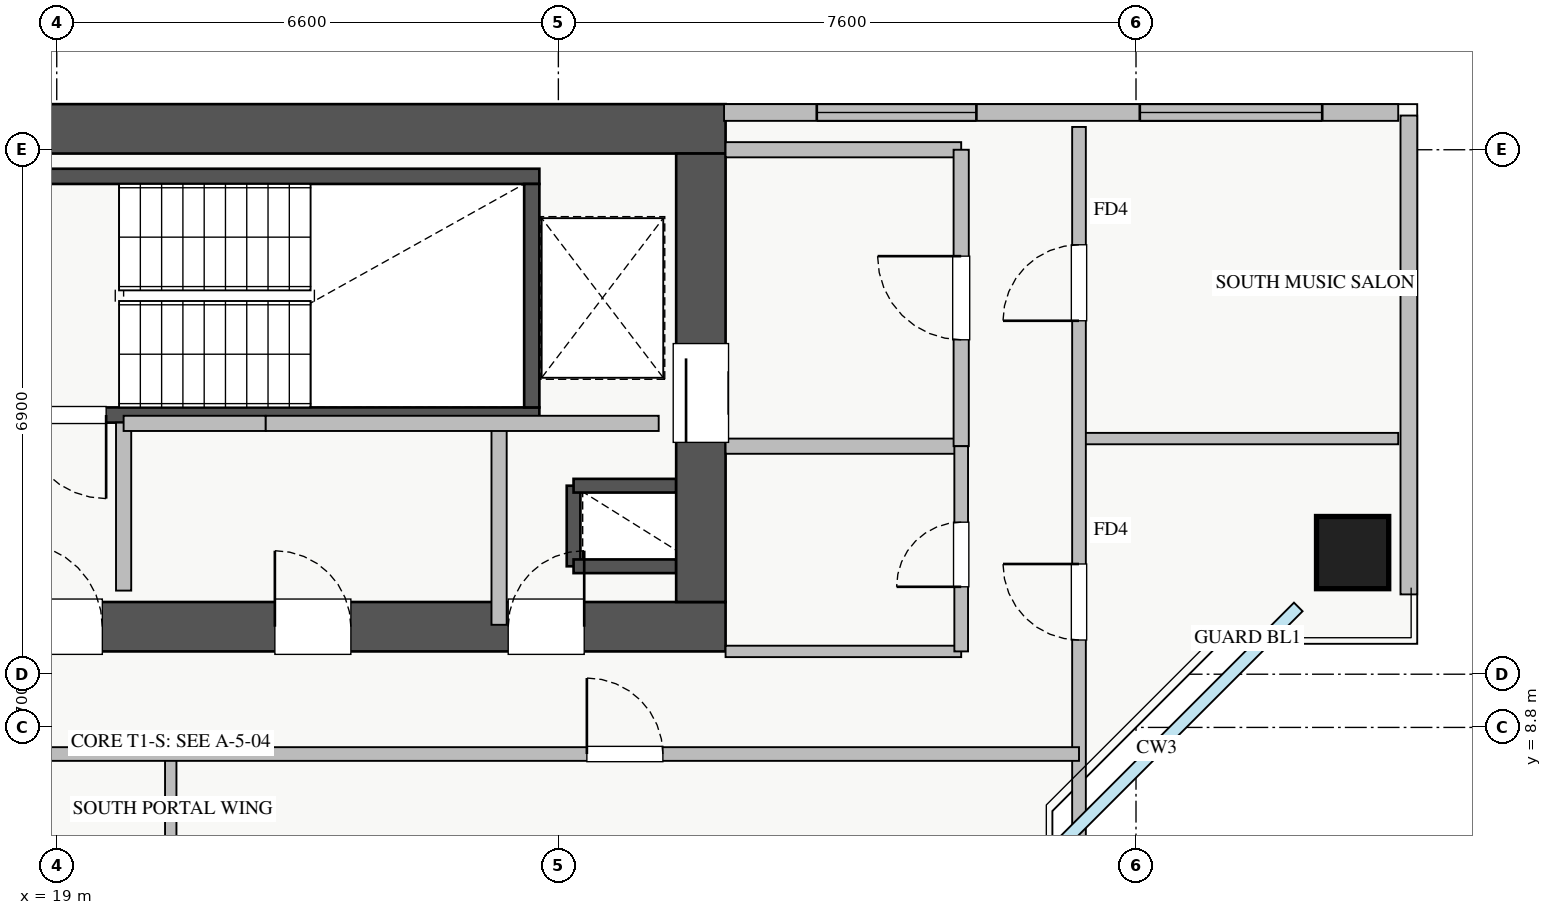
"""IFC4 building model, lengths in metres.
Left out: names, types, materials, properties, quantities, classifications, styles, units other than length and angle.
Written with IfcOpenShell. Run it as: python <this file> out.ifc"""

import sys

from ifc_helpers import new_model, si_unit, direction, frame, frame_2d, origin, origin_2d, place, context, subcontext, project, spatial, rectangle, extrude, source, transform, mapped, element, fill, save


model = new_model("IFC4")
c1 = context("Model", 3, precision=1e-05, world=origin(), true_north=direction((0.0, 1.0)))
c2 = subcontext(c1, "Body", "Model", "MODEL_VIEW")
j1 = project(units=[si_unit("LENGTHUNIT", "METRE"), si_unit("PLANEANGLEUNIT", "RADIAN")], contexts=[c1])
p1 = place(None, origin())
s1 = spatial("IfcSite", under=j1, at=p1, CompositionType="ELEMENT")
p2 = place(p1, origin())
s2 = spatial("IfcBuilding", under=s1, at=p2, CompositionType="ELEMENT")
p3 = place(p2, frame((0.0, 0.0, 166.5)))
s3 = spatial("IfcBuildingStorey", under=s2, at=p3, CompositionType="ELEMENT", Elevation=166.5)
p4 = place(p3, frame((25.8, 10.92, 0.0), z_axis=(0.0, 0.0, 1.0), x_axis=(0.0, 1.0, 0.0)))
e1 = element("IfcWall", 1, at=p4, inside=s3, PredefinedType="SHEAR", context=c2, shape_type="SweptSolid", body=[
    extrude(rectangle(XDim=1.06, YDim=0.18, at=frame_2d((0.53, 0.0))), origin(), (0.0, 0.0, 1.0), 3.07),
])
for number, where, z_axis, x_axis in (
    (2, (25.8, 11.98, 0.0), (0.0, 0.0, 1.0), (1.0, 0.0, 0.0)),
    (3, (25.8, 10.92, 0.0), (0.0, 0.0, 1.0), (1.0, 0.0, 0.0)),
):
    element("IfcWall", number, at=place(p3, frame(where, z_axis=z_axis, x_axis=x_axis)), inside=s3, PredefinedType="SHEAR", context=c2, shape_type="SweptSolid", body=[
        extrude(rectangle(XDim=1.35, YDim=0.18, at=frame_2d((0.675, 0.0))), origin(), (0.0, 0.0, 1.0), 3.07),
    ])
p5 = place(p3, frame((18.2, 12.91, 0.0), z_axis=(0.0, 0.0, 1.0), x_axis=(1.0, 0.0, 0.0)))
e4 = element("IfcWall", 4, at=p5, inside=s3, PredefinedType="SHEAR", context=c2, shape_type="SweptSolid", body=[
    extrude(rectangle(XDim=7.15, YDim=0.2, at=frame_2d((3.575, 0.0))), origin(), (0.0, 0.0, 1.0), 3.25),
])
p6 = place(p5, frame((0.35, 0.0, 0.0)))
e5 = element("IfcOpeningElement", 5, at=p6, cuts=e4, PredefinedType="OPENING", context=c2, shape_type="SweptSolid", body=[
    extrude(rectangle(XDim=1.1, YDim=2.05, at=frame_2d((0.55, 1.025))), frame((0.0, 0.11, 0.0), z_axis=(0.0, -1.0, 0.0), x_axis=(1.0, 0.0, 0.0)), (0.0, 0.0, 1.0), 0.22),
])
p7 = place(p3, frame((18.2, 16.05, 0.0), z_axis=(0.0, 0.0, 1.0), x_axis=(1.0, 0.0, 0.0)))
e6 = element("IfcWall", 6, at=p7, inside=s3, PredefinedType="SHEAR", context=c2, shape_type="SweptSolid", body=[
    extrude(rectangle(XDim=7.15, YDim=0.2, at=frame_2d((3.575, 0.0))), origin(), (0.0, 0.0, 1.0), 3.25),
])
p8 = place(p3, frame((25.25, 13.01, 0.0), z_axis=(0.0, 0.0, 1.0), x_axis=(0.0, 1.0, 0.0)))
e7 = element("IfcWall", 7, at=p8, inside=s3, PredefinedType="SHEAR", context=c2, shape_type="SweptSolid", body=[
    extrude(rectangle(XDim=2.94, YDim=0.2, at=frame_2d((1.47, 0.0))), origin(), (0.0, 0.0, 1.0), 3.25),
])
p9 = place(p3, frame((10.2, 10.125, 0.0), z_axis=(0.0, 0.0, 1.0), x_axis=(1.0, 0.0, 0.0)))
e8 = element("IfcWall", 8, at=p9, inside=s3, PredefinedType="SHEAR", context=c2, shape_type="SweptSolid", body=[
    extrude(rectangle(XDim=17.6, YDim=0.65, at=frame_2d((8.8, 0.0))), origin(), (0.0, 0.0, 1.0), 3.25),
])
p10 = place(p9, frame((1.15, 0.0, 0.0)))
e9 = element("IfcOpeningElement", 9, at=p10, cuts=e8, PredefinedType="OPENING", context=c2, shape_type="SweptSolid", body=[
    extrude(rectangle(XDim=1.1, YDim=2.05, at=frame_2d((0.55, 1.025))), frame((0.0, 0.335, 0.0), z_axis=(0.0, -1.0, 0.0), x_axis=(1.0, 0.0, 0.0)), (0.0, 0.0, 1.0), 0.67),
])
p11 = place(p9, frame((8.3, 0.0, 0.0)))
e10 = element("IfcOpeningElement", 10, at=p11, cuts=e8, PredefinedType="OPENING", context=c2, shape_type="SweptSolid", body=[
    extrude(rectangle(XDim=1.1, YDim=2.05, at=frame_2d((0.55, 1.025))), frame((0.0, 0.335, 0.0), z_axis=(0.0, -1.0, 0.0), x_axis=(1.0, 0.0, 0.0)), (0.0, 0.0, 1.0), 0.67),
])
p12 = place(p9, frame((4.9, 0.0, 0.0)))
e11 = element("IfcOpeningElement", 11, at=p12, cuts=e8, PredefinedType="OPENING", context=c2, shape_type="SweptSolid", body=[
    extrude(rectangle(XDim=1.1, YDim=2.05, at=frame_2d((0.55, 1.025))), frame((0.0, 0.335, 0.0), z_axis=(0.0, -1.0, 0.0), x_axis=(1.0, 0.0, 0.0)), (0.0, 0.0, 1.0), 0.67),
])
p13 = place(p9, frame((14.74, 0.0, 0.0)))
e12 = element("IfcOpeningElement", 12, at=p13, cuts=e8, PredefinedType="OPENING", context=c2, shape_type="SweptSolid", body=[
    extrude(rectangle(XDim=1.0, YDim=2.05, at=frame_2d((0.5, 1.025))), frame((0.0, 0.335, 0.0), z_axis=(0.0, -1.0, 0.0), x_axis=(1.0, 0.0, 0.0)), (0.0, 0.0, 1.0), 0.67),
])
p14 = place(p9, frame((11.67, 0.0, 0.0)))
e13 = element("IfcOpeningElement", 13, at=p14, cuts=e8, PredefinedType="OPENING", context=c2, shape_type="SweptSolid", body=[
    extrude(rectangle(XDim=1.0, YDim=2.05, at=frame_2d((0.5, 1.025))), frame((0.0, 0.335, 0.0), z_axis=(0.0, -1.0, 0.0), x_axis=(1.0, 0.0, 0.0)), (0.0, 0.0, 1.0), 0.67),
])
p15 = place(p3, frame((10.2, 16.675, 0.0), z_axis=(0.0, 0.0, 1.0), x_axis=(1.0, 0.0, 0.0)))
e14 = element("IfcWall", 14, at=p15, inside=s3, PredefinedType="SHEAR", context=c2, shape_type="SweptSolid", body=[
    extrude(rectangle(XDim=17.6, YDim=0.65, at=frame_2d((8.8, 0.0))), origin(), (0.0, 0.0, 1.0), 3.25),
])
p16 = place(p3, frame((27.475, 10.45, 0.0), z_axis=(0.0, 0.0, 1.0), x_axis=(0.0, 1.0, 0.0)))
e15 = element("IfcWall", 15, at=p16, inside=s3, PredefinedType="SHEAR", context=c2, shape_type="SweptSolid", body=[
    extrude(rectangle(XDim=5.9, YDim=0.65, at=frame_2d((2.95, 0.0))), origin(), (0.0, 0.0, 1.0), 3.25),
])
p17 = place(p16, frame((2.1, 0.0, 0.0)))
e16 = element("IfcOpeningElement", 16, at=p17, cuts=e15, PredefinedType="OPENING", context=c2, shape_type="SweptSolid", body=[
    extrude(rectangle(XDim=1.3, YDim=2.05, at=frame_2d((0.65, 1.025))), frame((0.0, 0.335, 0.0), z_axis=(0.0, -1.0, 0.0), x_axis=(1.0, 0.0, 0.0)), (0.0, 0.0, 1.0), 0.67),
])
m1 = source(origin(), c2, "Body", "SweptSolid", [
    extrude(rectangle(XDim=0.95, YDim=0.95, at=origin_2d()), origin(), (0.0, 0.0, 1.0), 3.25),
])
p18 = place(p3, frame((36.05, 11.1, 0.0), z_axis=(0.0, 0.0, 1.0), x_axis=(1.0, 0.0, 0.0)))
e17 = element("IfcColumn", 17, at=p18, inside=s3, PredefinedType="COLUMN", context=c2, shape_type="MappedRepresentation", body=[
    mapped(m1, transform((0.0, 0.0, 0.0), x_axis=(1.0, 0.0, 0.0), y_axis=(0.0, 1.0, 0.0), z_axis=(0.0, 0.0, 1.0), scale=1.0)),
])
p19 = place(p3, frame((27.78, 16.89, 0.0), z_axis=(0.0, 0.0, 1.0), x_axis=(1.0, 0.0, 0.0)))
e18 = element("IfcWall", 18, at=p19, inside=s3, PredefinedType="STANDARD", context=c2, shape_type="SweptSolid", body=[
    extrude(rectangle(XDim=8.87, YDim=0.22, at=frame_2d((4.435, 0.0))), origin(), (0.0, 0.0, 1.0), 2.61),
])
p20 = place(p19, frame((1.22, 0.0, 0.9)))
e19 = element("IfcOpeningElement", 19, at=p20, cuts=e18, PredefinedType="OPENING", context=c2, shape_type="SweptSolid", body=[
    extrude(rectangle(XDim=2.1, YDim=1.48, at=frame_2d((1.05, 0.74))), frame((0.0, 0.12, 0.0), z_axis=(0.0, -1.0, 0.0), x_axis=(1.0, 0.0, 0.0)), (0.0, 0.0, 1.0), 0.24),
])
p21 = place(p19, frame((5.47, 0.0, 0.9)))
e20 = element("IfcOpeningElement", 20, at=p21, cuts=e18, PredefinedType="OPENING", context=c2, shape_type="SweptSolid", body=[
    extrude(rectangle(XDim=2.4, YDim=1.48, at=frame_2d((1.2, 0.74))), frame((0.0, 0.12, 0.0), z_axis=(0.0, -1.0, 0.0), x_axis=(1.0, 0.0, 0.0)), (0.0, 0.0, 1.0), 0.24),
])
p22 = place(p3, frame((36.79, 10.55, 0.0), z_axis=(0.0, 0.0, 1.0), x_axis=(0.0, 1.0, 0.0)))
e21 = element("IfcWall", 21, at=p22, inside=s3, PredefinedType="STANDARD", context=c2, shape_type="SweptSolid", body=[
    extrude(rectangle(XDim=6.3, YDim=0.22, at=frame_2d((3.15, 0.0))), origin(), (0.0, 0.0, 1.0), 2.61),
])
for number, where, z_axis, x_axis in (
    (22, (27.8, 16.4, 0.0), (0.0, 0.0, 1.0), (1.0, 0.0, 0.0)),
    (23, (27.8, 12.5, 0.0), (0.0, 0.0, 1.0), (1.0, 0.0, 0.0)),
):
    element("IfcWall", number, at=place(p3, frame(where, z_axis=z_axis, x_axis=x_axis)), inside=s3, PredefinedType="PARTITIONING", context=c2, shape_type="SweptSolid", body=[
        extrude(rectangle(XDim=3.1, YDim=0.2, at=frame_2d((1.55, 0.0))), origin(), (0.0, 0.0, 1.0), 3.07),
    ])
p23 = place(p3, frame((30.9, 12.5, 0.0), z_axis=(0.0, 0.0, 1.0), x_axis=(0.0, 1.0, 0.0)))
e24 = element("IfcWall", 24, at=p23, inside=s3, PredefinedType="PARTITIONING", context=c2, shape_type="SweptSolid", body=[
    extrude(rectangle(XDim=3.9, YDim=0.2, at=frame_2d((1.95, 0.0))), origin(), (0.0, 0.0, 1.0), 3.07),
])
p24 = place(p23, frame((1.4, 0.0, 0.0)))
e25 = element("IfcOpeningElement", 25, at=p24, cuts=e24, PredefinedType="OPENING", context=c2, shape_type="SweptSolid", body=[
    extrude(rectangle(XDim=1.1, YDim=2.05, at=frame_2d((0.55, 1.025))), frame((0.0, 0.11, 0.0), z_axis=(0.0, -1.0, 0.0), x_axis=(1.0, 0.0, 0.0)), (0.0, 0.0, 1.0), 0.22),
])
p25 = place(p3, frame((19.88, 10.6, 0.0), z_axis=(0.0, 0.0, 1.0), x_axis=(0.0, 1.0, 0.0)))
e26 = element("IfcWall", 26, at=p25, inside=s3, PredefinedType="PARTITIONING", context=c2, shape_type="SweptSolid", body=[
    extrude(rectangle(XDim=2.21, YDim=0.2, at=frame_2d((1.105, 0.0))), origin(), (0.0, 0.0, 1.0), 3.07),
])
p26 = place(p3, frame((24.82, 10.15, 0.0), z_axis=(0.0, 0.0, 1.0), x_axis=(0.0, 1.0, 0.0)))
e27 = element("IfcWall", 27, at=p26, inside=s3, PredefinedType="PARTITIONING", context=c2, shape_type="SweptSolid", body=[
    extrude(rectangle(XDim=2.65, YDim=0.2, at=frame_2d((1.325, 0.0))), origin(), (0.0, 0.0, 1.0), 3.07),
])
p27 = place(p3, frame((19.88, 12.8, 0.0), z_axis=(0.0, 0.0, 1.0), x_axis=(1.0, 0.0, 0.0)))
e28 = element("IfcWall", 28, at=p27, inside=s3, PredefinedType="PARTITIONING", context=c2, shape_type="SweptSolid", body=[
    extrude(rectangle(XDim=1.87, YDim=0.2, at=frame_2d((0.935, 0.0))), origin(), (0.0, 0.0, 1.0), 3.07),
])
p28 = place(p3, frame((21.75, 12.8, 0.0), z_axis=(0.0, 0.0, 1.0), x_axis=(1.0, 0.0, 0.0)))
e29 = element("IfcWall", 29, at=p28, inside=s3, PredefinedType="PARTITIONING", context=c2, shape_type="SweptSolid", body=[
    extrude(rectangle(XDim=5.17, YDim=0.2, at=frame_2d((2.585, 0.0))), origin(), (0.0, 0.0, 1.0), 3.07),
])
p29 = place(p3, frame((27.8, 9.8, 0.0), z_axis=(0.0, 0.0, 1.0), x_axis=(1.0, 0.0, 0.0)))
e30 = element("IfcWall", 30, at=p29, inside=s3, PredefinedType="PARTITIONING", context=c2, shape_type="SweptSolid", body=[
    extrude(rectangle(XDim=3.1, YDim=0.15, at=frame_2d((1.55, 0.0))), origin(), (0.0, 0.0, 1.0), 3.07),
])
p30 = place(p3, frame((30.9, 9.8, 0.0), z_axis=(0.0, 0.0, 1.0), x_axis=(0.0, 1.0, 0.0)))
e31 = element("IfcWall", 31, at=p30, inside=s3, PredefinedType="PARTITIONING", context=c2, shape_type="SweptSolid", body=[
    extrude(rectangle(XDim=2.7, YDim=0.18, at=frame_2d((1.35, 0.0))), origin(), (0.0, 0.0, 1.0), 2.565),
])
p31 = place(p30, frame((0.85, 0.0, 0.0)))
e32 = element("IfcOpeningElement", 32, at=p31, cuts=e31, PredefinedType="OPENING", context=c2, shape_type="SweptSolid", body=[
    extrude(rectangle(XDim=0.85, YDim=2.05, at=frame_2d((0.425, 1.025))), frame((0.0, 0.1, 0.0), z_axis=(0.0, -1.0, 0.0), x_axis=(1.0, 0.0, 0.0)), (0.0, 0.0, 1.0), 0.2),
])
p32 = place(p3, frame((32.45, 12.6, 0.0), z_axis=(0.0, 0.0, 1.0), x_axis=(1.0, 0.0, 0.0)))
e33 = element("IfcWall", 33, at=p32, inside=s3, PredefinedType="PARTITIONING", context=c2, shape_type="SweptSolid", body=[
    extrude(rectangle(XDim=4.2, YDim=0.15, at=frame_2d((2.1, 0.0))), origin(), (0.0, 0.0, 1.0), 3.07),
])
p33 = place(p3, frame((32.45, 5.35, 0.0), z_axis=(0.0, 0.0, 1.0), x_axis=(0.0, 1.0, 0.0)))
e34 = element("IfcWall", 34, at=p33, inside=s3, PredefinedType="PARTITIONING", context=c2, shape_type="SweptSolid", body=[
    extrude(rectangle(XDim=11.35, YDim=0.18, at=frame_2d((5.675, 0.0))), origin(), (0.0, 0.0, 1.0), 3.07),
])
p34 = place(p33, frame((4.6, 0.0, 0.0)))
e35 = element("IfcOpeningElement", 35, at=p34, cuts=e34, PredefinedType="OPENING", context=c2, shape_type="SweptSolid", body=[
    extrude(rectangle(XDim=1.0, YDim=2.05, at=frame_2d((0.5, 1.025))), frame((0.0, 0.1, 0.0), z_axis=(0.0, -1.0, 0.0), x_axis=(1.0, 0.0, 0.0)), (0.0, 0.0, 1.0), 0.2),
])
p35 = place(p33, frame((8.8, 0.0, 0.0)))
e36 = element("IfcOpeningElement", 36, at=p35, cuts=e34, PredefinedType="OPENING", context=c2, shape_type="SweptSolid", body=[
    extrude(rectangle(XDim=1.0, YDim=2.05, at=frame_2d((0.5, 1.025))), frame((0.0, 0.1, 0.0), z_axis=(0.0, -1.0, 0.0), x_axis=(1.0, 0.0, 0.0)), (0.0, 0.0, 1.0), 0.2),
])
p36 = place(p3, frame((20.5, 5.35, 0.0), z_axis=(0.0, 0.0, 1.0), x_axis=(0.0, 1.0, 0.0)))
e37 = element("IfcWall", 37, at=p36, inside=s3, PredefinedType="PARTITIONING", context=c2, shape_type="SweptSolid", body=[
    extrude(rectangle(XDim=3.1, YDim=0.15, at=frame_2d((1.55, 0.0))), origin(), (0.0, 0.0, 1.0), 3.07),
])
p37 = place(p3, frame((8.65, 8.45, 0.0), z_axis=(0.0, 0.0, 1.0), x_axis=(1.0, 0.0, 0.0)))
e38 = element("IfcWall", 38, at=p37, inside=s3, PredefinedType="PARTITIONING", context=c2, shape_type="SweptSolid", body=[
    extrude(rectangle(XDim=23.8, YDim=0.18, at=frame_2d((11.9, 0.0))), origin(), (0.0, 0.0, 1.0), 3.07),
])
p38 = place(p37, frame((5.425, 0.0, 0.0)))
e39 = element("IfcOpeningElement", 39, at=p38, cuts=e38, PredefinedType="OPENING", context=c2, shape_type="SweptSolid", body=[
    extrude(rectangle(XDim=1.0, YDim=2.05, at=frame_2d((0.5, 1.025))), frame((0.0, 0.1, 0.0), z_axis=(0.0, -1.0, 0.0), x_axis=(1.0, 0.0, 0.0)), (0.0, 0.0, 1.0), 0.2),
])
p39 = place(p37, frame((17.325, 0.0, 0.0)))
e40 = element("IfcOpeningElement", 40, at=p39, cuts=e38, PredefinedType="OPENING", context=c2, shape_type="SweptSolid", body=[
    extrude(rectangle(XDim=1.0, YDim=2.05, at=frame_2d((0.5, 1.025))), frame((0.0, 0.1, 0.0), z_axis=(0.0, -1.0, 0.0), x_axis=(1.0, 0.0, 0.0)), (0.0, 0.0, 1.0), 0.2),
])
m2 = source(origin(), c2, "Body", "SweptSolid", [
    extrude(rectangle(XDim=2.1, YDim=1.48, at=frame_2d((1.05, 0.74))), frame((0.0, 0.03, 0.0), z_axis=(0.0, -1.0, 0.0), x_axis=(1.0, 0.0, 0.0)), (0.0, 0.0, 1.0), 0.06),
])
p40 = place(p20, origin())
e41 = element("IfcWindow", 41, at=p40, inside=s3, PartitioningType="TRIPLE_PANEL_VERTICAL", PredefinedType="WINDOW", context=c2, shape_type="MappedRepresentation", body=[
    mapped(m2, transform((0.0, 0.0, 0.0), x_axis=(1.0, 0.0, 0.0), y_axis=(0.0, 1.0, 0.0), z_axis=(0.0, 0.0, 1.0), scale=1.0)),
])
fill(e19, e41)
m3 = source(origin(), c2, "Body", "SweptSolid", [
    extrude(rectangle(XDim=2.4, YDim=1.48, at=frame_2d((1.2, 0.74))), frame((0.0, 0.03, 0.0), z_axis=(0.0, -1.0, 0.0), x_axis=(1.0, 0.0, 0.0)), (0.0, 0.0, 1.0), 0.06),
])
p41 = place(p21, origin())
e42 = element("IfcWindow", 42, at=p41, inside=s3, PartitioningType="TRIPLE_PANEL_VERTICAL", PredefinedType="WINDOW", context=c2, shape_type="MappedRepresentation", body=[
    mapped(m3, transform((0.0, 0.0, 0.0), x_axis=(1.0, 0.0, 0.0), y_axis=(0.0, 1.0, 0.0), z_axis=(0.0, 0.0, 1.0), scale=1.0)),
])
fill(e20, e42)
m4 = source(origin(), c2, "Body", "SweptSolid", [
    extrude(rectangle(XDim=1.3, YDim=2.05, at=frame_2d((0.65, 1.025))), frame((0.0, 0.025, 0.0), z_axis=(0.0, -1.0, 0.0), x_axis=(1.0, 0.0, 0.0)), (0.0, 0.0, 1.0), 0.05),
])
p42 = place(p17, origin())
e43 = element("IfcDoor", 43, at=p42, inside=s3, OperationType="SLIDING_TO_RIGHT", PredefinedType="DOOR", context=c2, shape_type="MappedRepresentation", body=[
    mapped(m4, transform((0.0, 0.0, 0.0), x_axis=(1.0, 0.0, 0.0), y_axis=(0.0, 1.0, 0.0), z_axis=(0.0, 0.0, 1.0), scale=1.0)),
])
fill(e16, e43)
m5 = source(origin(), c2, "Body", "SweptSolid", [
    extrude(rectangle(XDim=1.1, YDim=2.05, at=frame_2d((0.55, 1.025))), frame((0.0, 0.025, 0.0), z_axis=(0.0, -1.0, 0.0), x_axis=(1.0, 0.0, 0.0)), (0.0, 0.0, 1.0), 0.05),
])
p43 = place(p11, origin())
e44 = element("IfcDoor", 44, at=p43, inside=s3, OperationType="SINGLE_SWING_LEFT", PredefinedType="DOOR", context=c2, shape_type="MappedRepresentation", body=[
    mapped(m5, transform((0.0, 0.0, 0.0), x_axis=(1.0, 0.0, 0.0), y_axis=(0.0, 1.0, 0.0), z_axis=(0.0, 0.0, 1.0), scale=1.0)),
])
fill(e10, e44)
p44 = place(p6, frame((1.1, 0.0, 0.0), z_axis=(0.0, 0.0, 1.0), x_axis=(-1.0, 0.0, 0.0)))
e45 = element("IfcDoor", 45, at=p44, inside=s3, OperationType="SINGLE_SWING_RIGHT", PredefinedType="DOOR", context=c2, shape_type="MappedRepresentation", body=[
    mapped(m5, transform((0.0, 0.0, 0.0), x_axis=(1.0, 0.0, 0.0), y_axis=(0.0, 1.0, 0.0), z_axis=(0.0, 0.0, 1.0), scale=1.0)),
])
fill(e5, e45)
m6 = source(origin(), c2, "Body", "SweptSolid", [
    extrude(rectangle(XDim=1.0, YDim=2.05, at=frame_2d((0.5, 1.025))), frame((0.0, 0.025, 0.0), z_axis=(0.0, -1.0, 0.0), x_axis=(1.0, 0.0, 0.0)), (0.0, 0.0, 1.0), 0.05),
])
p45 = place(p13, origin())
e46 = element("IfcDoor", 46, at=p45, inside=s3, OperationType="SINGLE_SWING_RIGHT", PredefinedType="DOOR", context=c2, shape_type="MappedRepresentation", body=[
    mapped(m6, transform((0.0, 0.0, 0.0), x_axis=(1.0, 0.0, 0.0), y_axis=(0.0, 1.0, 0.0), z_axis=(0.0, 0.0, 1.0), scale=1.0)),
])
fill(e12, e46)
p46 = place(p14, origin())
e47 = element("IfcDoor", 47, at=p46, inside=s3, OperationType="SINGLE_SWING_LEFT", PredefinedType="DOOR", context=c2, shape_type="MappedRepresentation", body=[
    mapped(m6, transform((0.0, 0.0, 0.0), x_axis=(1.0, 0.0, 0.0), y_axis=(0.0, 1.0, 0.0), z_axis=(0.0, 0.0, 1.0), scale=1.0)),
])
fill(e13, e47)
p47 = place(p24, origin())
e48 = element("IfcDoor", 48, at=p47, inside=s3, OperationType="SINGLE_SWING_RIGHT", PredefinedType="DOOR", context=c2, shape_type="MappedRepresentation", body=[
    mapped(m5, transform((0.0, 0.0, 0.0), x_axis=(1.0, 0.0, 0.0), y_axis=(0.0, 1.0, 0.0), z_axis=(0.0, 0.0, 1.0), scale=1.0)),
])
fill(e25, e48)
m7 = source(origin(), c2, "Body", "SweptSolid", [
    extrude(rectangle(XDim=0.85, YDim=2.05, at=frame_2d((0.425, 1.025))), frame((0.0, 0.025, 0.0), z_axis=(0.0, -1.0, 0.0), x_axis=(1.0, 0.0, 0.0)), (0.0, 0.0, 1.0), 0.05),
])
p48 = place(p31, origin())
e49 = element("IfcDoor", 49, at=p48, inside=s3, OperationType="SINGLE_SWING_LEFT", PredefinedType="DOOR", context=c2, shape_type="MappedRepresentation", body=[
    mapped(m7, transform((0.0, 0.0, 0.0), x_axis=(1.0, 0.0, 0.0), y_axis=(0.0, 1.0, 0.0), z_axis=(0.0, 0.0, 1.0), scale=1.0)),
])
fill(e32, e49)
p49 = place(p34, origin())
e50 = element("IfcDoor", 50, at=p49, inside=s3, OperationType="SINGLE_SWING_RIGHT", PredefinedType="DOOR", context=c2, shape_type="MappedRepresentation", body=[
    mapped(m6, transform((0.0, 0.0, 0.0), x_axis=(1.0, 0.0, 0.0), y_axis=(0.0, 1.0, 0.0), z_axis=(0.0, 0.0, 1.0), scale=1.0)),
])
fill(e35, e50)
p50 = place(p35, origin())
e51 = element("IfcDoor", 51, at=p50, inside=s3, OperationType="SINGLE_SWING_LEFT", PredefinedType="DOOR", context=c2, shape_type="MappedRepresentation", body=[
    mapped(m6, transform((0.0, 0.0, 0.0), x_axis=(1.0, 0.0, 0.0), y_axis=(0.0, 1.0, 0.0), z_axis=(0.0, 0.0, 1.0), scale=1.0)),
])
fill(e36, e51)
p51 = place(p39, origin())
e52 = element("IfcDoor", 52, at=p51, inside=s3, OperationType="SINGLE_SWING_LEFT", PredefinedType="DOOR", context=c2, shape_type="MappedRepresentation", body=[
    mapped(m6, transform((0.0, 0.0, 0.0), x_axis=(1.0, 0.0, 0.0), y_axis=(0.0, 1.0, 0.0), z_axis=(0.0, 0.0, 1.0), scale=1.0)),
])
fill(e40, e52)
save(model, sys.argv[1])
